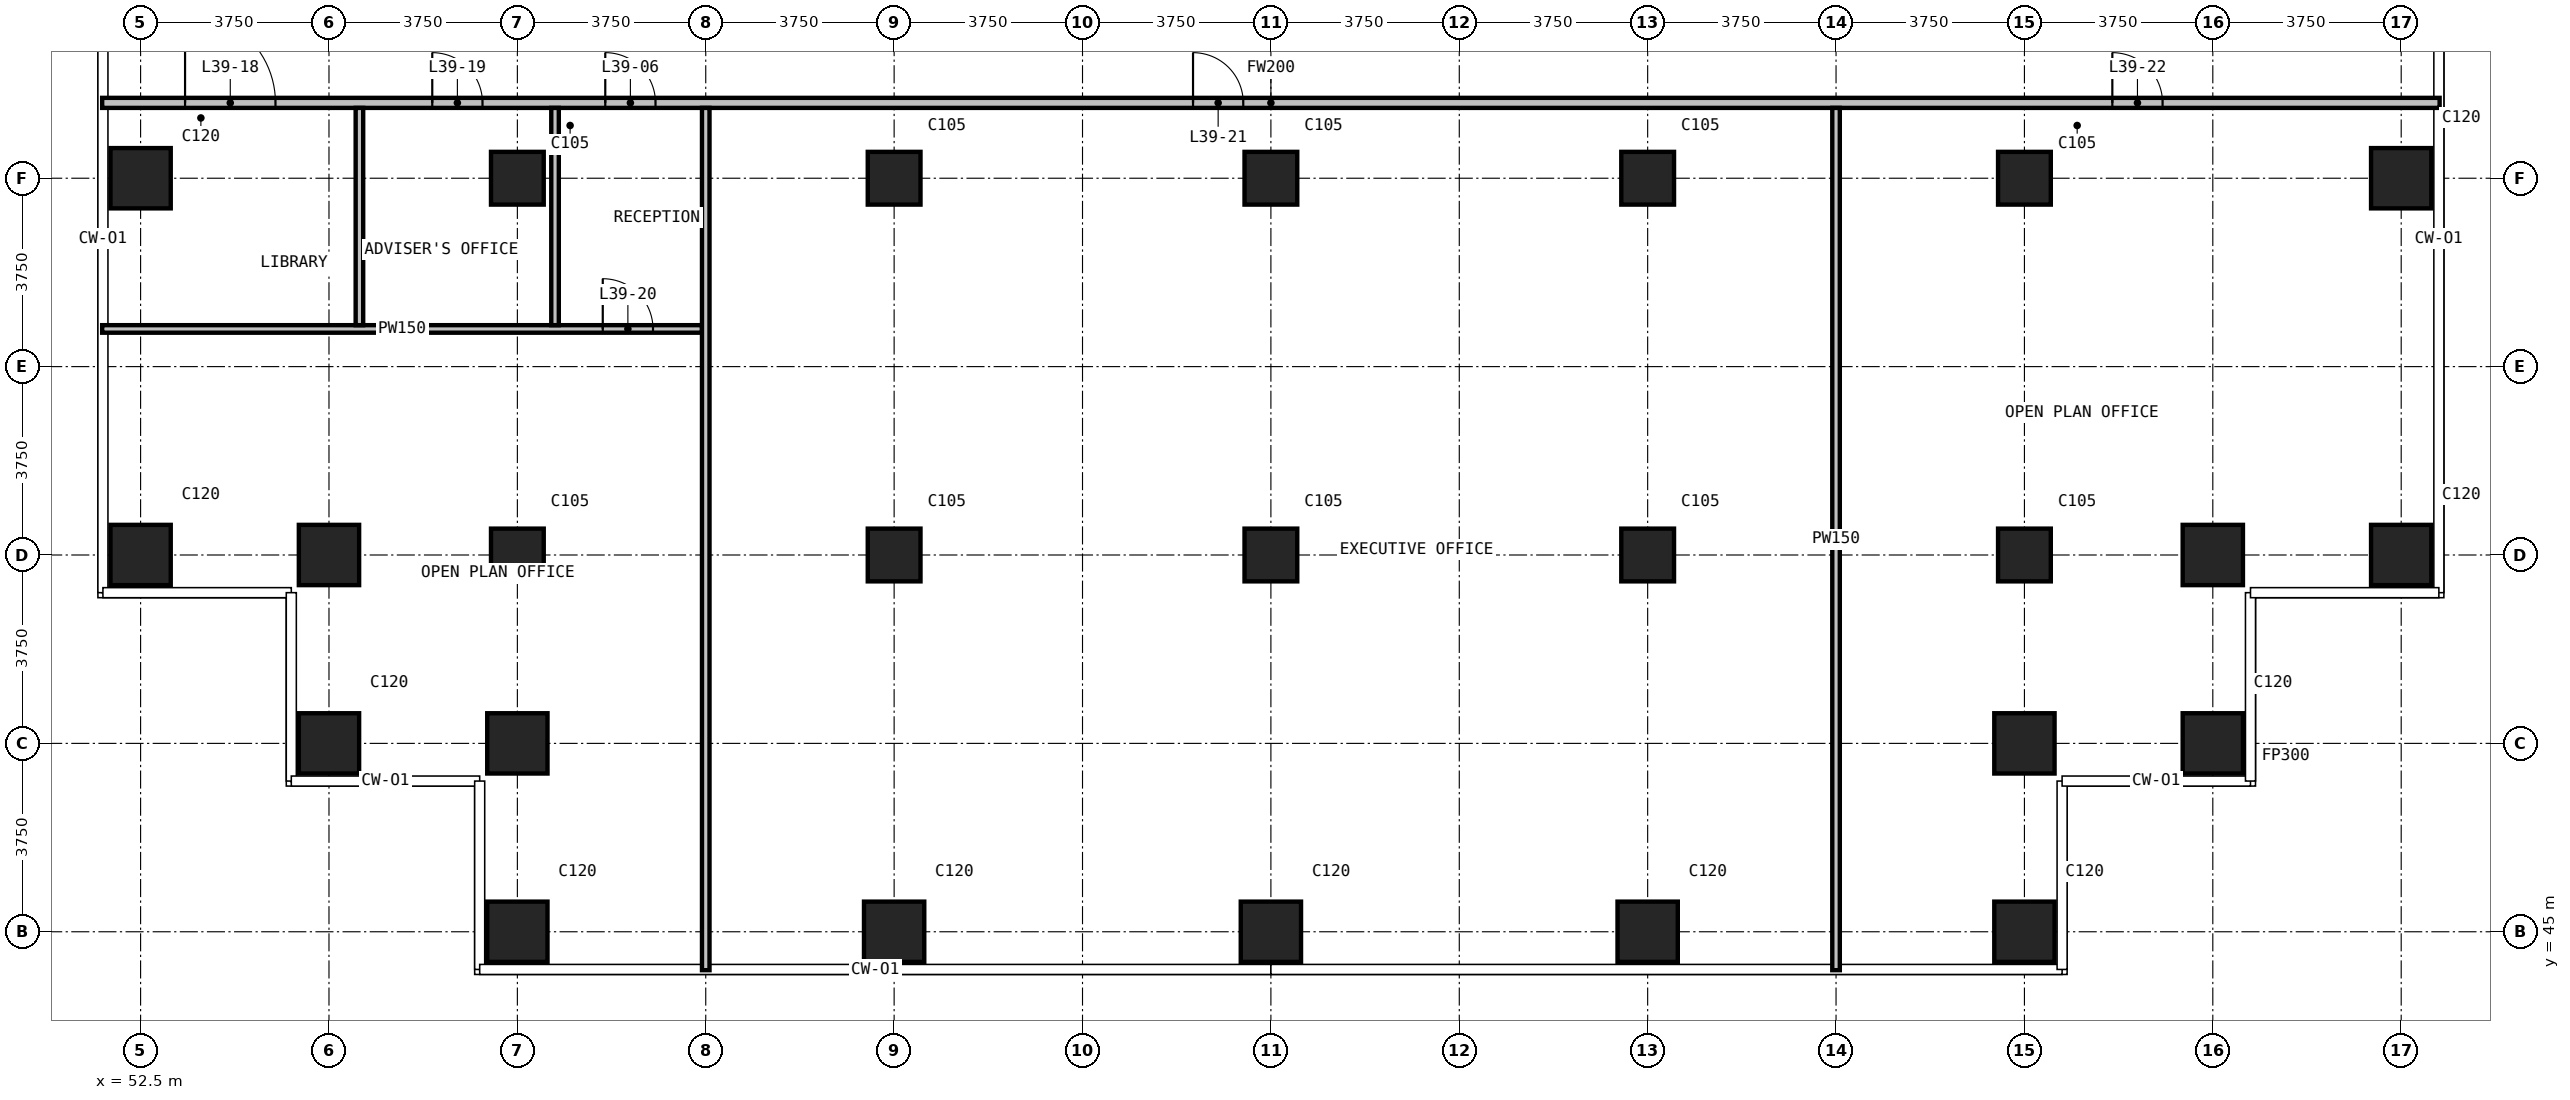
"""IFC4 building model, lengths in metres.
Left out: names, types, materials, properties, quantities, classifications, styles, units other than length and angle.
Written with IfcOpenShell. Run it as: python <this file> out.ifc"""

import sys

from ifc_helpers import new_model, si_unit, direction, frame, frame_2d, origin, origin_2d, place, context, subcontext, project, spatial, rectangle, extrude, element, fill, save


model = new_model("IFC4")
c1 = context("Model", 3, precision=1e-05, world=origin(), true_north=direction((0.0, 1.0)))
c2 = subcontext(c1, "Body", "Model", "MODEL_VIEW")
j1 = project(units=[si_unit("LENGTHUNIT", "METRE"), si_unit("PLANEANGLEUNIT", "RADIAN")], contexts=[c1])
p1 = place(None, origin())
s1 = spatial("IfcSite", under=j1, at=p1, CompositionType="ELEMENT")
p2 = place(p1, origin())
s2 = spatial("IfcBuilding", under=s1, at=p2, CompositionType="ELEMENT")
p3 = place(p2, frame((0.0, 0.0, 154.9)))
s3 = spatial("IfcBuildingStorey", under=s2, at=p3, CompositionType="ELEMENT", Elevation=154.9)
for number, where, z_axis, x_axis in (
    (1, (52.5, 52.5, 0.0), (0.0, 0.0, 1.0), (1.0, 0.0, 0.0)),
    (2, (52.5, 60.0, 0.0), (0.0, 0.0, 1.0), (1.0, 0.0, 0.0)),
    (3, (56.25, 48.75, 0.0), (0.0, 0.0, 1.0), (1.0, 0.0, 0.0)),
    (4, (56.25, 52.5, 0.0), (0.0, 0.0, 1.0), (1.0, 0.0, 0.0)),
    (5, (60.0, 45.0, 0.0), (0.0, 0.0, 1.0), (1.0, 0.0, 0.0)),
    (6, (60.0, 48.75, 0.0), (0.0, 0.0, 1.0), (1.0, 0.0, 0.0)),
):
    element("IfcColumn", number, at=place(p3, frame(where, z_axis=z_axis, x_axis=x_axis)), inside=s3, PredefinedType="COLUMN", context=c2, shape_type="SweptSolid", body=[
        extrude(rectangle(XDim=1.2, YDim=1.2, at=origin_2d()), origin(), (0.0, 0.0, 1.0), 3.6),
    ])
for number, where, z_axis, x_axis in (
    (7, (60.0, 52.5, 0.0), (0.0, 0.0, 1.0), (1.0, 0.0, 0.0)),
    (8, (60.0, 60.0, 0.0), (0.0, 0.0, 1.0), (1.0, 0.0, 0.0)),
):
    element("IfcColumn", number, at=place(p3, frame(where, z_axis=z_axis, x_axis=x_axis)), inside=s3, PredefinedType="COLUMN", context=c2, shape_type="SweptSolid", body=[
        extrude(rectangle(XDim=1.05, YDim=1.05, at=origin_2d()), origin(), (0.0, 0.0, 1.0), 3.6),
    ])
p4 = place(p3, frame((67.5, 45.0, 0.0), z_axis=(0.0, 0.0, 1.0), x_axis=(1.0, 0.0, 0.0)))
e9 = element("IfcColumn", 9, at=p4, inside=s3, PredefinedType="COLUMN", context=c2, shape_type="SweptSolid", body=[
    extrude(rectangle(XDim=1.2, YDim=1.2, at=origin_2d()), origin(), (0.0, 0.0, 1.0), 3.6),
])
for number, where, z_axis, x_axis in (
    (10, (67.5, 52.5, 0.0), (0.0, 0.0, 1.0), (1.0, 0.0, 0.0)),
    (11, (67.5, 60.0, 0.0), (0.0, 0.0, 1.0), (1.0, 0.0, 0.0)),
):
    element("IfcColumn", number, at=place(p3, frame(where, z_axis=z_axis, x_axis=x_axis)), inside=s3, PredefinedType="COLUMN", context=c2, shape_type="SweptSolid", body=[
        extrude(rectangle(XDim=1.05, YDim=1.05, at=origin_2d()), origin(), (0.0, 0.0, 1.0), 3.6),
    ])
p5 = place(p3, frame((75.0, 45.0, 0.0), z_axis=(0.0, 0.0, 1.0), x_axis=(1.0, 0.0, 0.0)))
e12 = element("IfcColumn", 12, at=p5, inside=s3, PredefinedType="COLUMN", context=c2, shape_type="SweptSolid", body=[
    extrude(rectangle(XDim=1.2, YDim=1.2, at=origin_2d()), origin(), (0.0, 0.0, 1.0), 3.6),
])
for number, where, z_axis, x_axis in (
    (13, (75.0, 52.5, 0.0), (0.0, 0.0, 1.0), (1.0, 0.0, 0.0)),
    (14, (75.0, 60.0, 0.0), (0.0, 0.0, 1.0), (1.0, 0.0, 0.0)),
):
    element("IfcColumn", number, at=place(p3, frame(where, z_axis=z_axis, x_axis=x_axis)), inside=s3, PredefinedType="COLUMN", context=c2, shape_type="SweptSolid", body=[
        extrude(rectangle(XDim=1.05, YDim=1.05, at=origin_2d()), origin(), (0.0, 0.0, 1.0), 3.6),
    ])
p6 = place(p3, frame((82.5, 45.0, 0.0), z_axis=(0.0, 0.0, 1.0), x_axis=(1.0, 0.0, 0.0)))
e15 = element("IfcColumn", 15, at=p6, inside=s3, PredefinedType="COLUMN", context=c2, shape_type="SweptSolid", body=[
    extrude(rectangle(XDim=1.2, YDim=1.2, at=origin_2d()), origin(), (0.0, 0.0, 1.0), 3.6),
])
for number, where, z_axis, x_axis in (
    (16, (82.5, 52.5, 0.0), (0.0, 0.0, 1.0), (1.0, 0.0, 0.0)),
    (17, (82.5, 60.0, 0.0), (0.0, 0.0, 1.0), (1.0, 0.0, 0.0)),
):
    element("IfcColumn", number, at=place(p3, frame(where, z_axis=z_axis, x_axis=x_axis)), inside=s3, PredefinedType="COLUMN", context=c2, shape_type="SweptSolid", body=[
        extrude(rectangle(XDim=1.05, YDim=1.05, at=origin_2d()), origin(), (0.0, 0.0, 1.0), 3.6),
    ])
for number, where, z_axis, x_axis in (
    (18, (90.0, 45.0, 0.0), (0.0, 0.0, 1.0), (1.0, 0.0, 0.0)),
    (19, (90.0, 48.75, 0.0), (0.0, 0.0, 1.0), (1.0, 0.0, 0.0)),
):
    element("IfcColumn", number, at=place(p3, frame(where, z_axis=z_axis, x_axis=x_axis)), inside=s3, PredefinedType="COLUMN", context=c2, shape_type="SweptSolid", body=[
        extrude(rectangle(XDim=1.2, YDim=1.2, at=origin_2d()), origin(), (0.0, 0.0, 1.0), 3.6),
    ])
for number, where, z_axis, x_axis in (
    (20, (90.0, 52.5, 0.0), (0.0, 0.0, 1.0), (1.0, 0.0, 0.0)),
    (21, (90.0, 60.0, 0.0), (0.0, 0.0, 1.0), (1.0, 0.0, 0.0)),
):
    element("IfcColumn", number, at=place(p3, frame(where, z_axis=z_axis, x_axis=x_axis)), inside=s3, PredefinedType="COLUMN", context=c2, shape_type="SweptSolid", body=[
        extrude(rectangle(XDim=1.05, YDim=1.05, at=origin_2d()), origin(), (0.0, 0.0, 1.0), 3.6),
    ])
for number, where, z_axis, x_axis in (
    (22, (93.75, 48.75, 0.0), (0.0, 0.0, 1.0), (1.0, 0.0, 0.0)),
    (23, (93.75, 52.5, 0.0), (0.0, 0.0, 1.0), (1.0, 0.0, 0.0)),
    (24, (97.5, 52.5, 0.0), (0.0, 0.0, 1.0), (1.0, 0.0, 0.0)),
    (25, (97.5, 60.0, 0.0), (0.0, 0.0, 1.0), (1.0, 0.0, 0.0)),
):
    element("IfcColumn", number, at=place(p3, frame(where, z_axis=z_axis, x_axis=x_axis)), inside=s3, PredefinedType="COLUMN", context=c2, shape_type="SweptSolid", body=[
        extrude(rectangle(XDim=1.2, YDim=1.2, at=origin_2d()), origin(), (0.0, 0.0, 1.0), 3.6),
    ])
p7 = place(p3, frame((51.735, 61.5, 0.0), z_axis=(0.0, 0.0, 1.0), x_axis=(1.0, 0.0, 0.0)))
e26 = element("IfcWall", 26, at=p7, inside=s3, PredefinedType="PARTITIONING", context=c2, shape_type="SweptSolid", body=[
    extrude(rectangle(XDim=46.53, YDim=0.2, at=frame_2d((23.265, 0.0))), origin(), (0.0, 0.0, 1.0), 3.3),
])
p8 = place(p7, frame((10.015, 0.0, 0.0)))
e27 = element("IfcOpeningElement", 27, at=p8, cuts=e26, PredefinedType="OPENING", context=c2, shape_type="SweptSolid", body=[
    extrude(rectangle(XDim=1.0, YDim=2.2, at=frame_2d((0.5, 1.1))), frame((0.0, 0.11, 0.0), z_axis=(0.0, -1.0, 0.0), x_axis=(1.0, 0.0, 0.0)), (0.0, 0.0, 1.0), 0.22),
])
p9 = place(p7, frame((1.65, 0.0, 0.0)))
e28 = element("IfcOpeningElement", 28, at=p9, cuts=e26, PredefinedType="OPENING", context=c2, shape_type="SweptSolid", body=[
    extrude(rectangle(XDim=1.8, YDim=2.2, at=frame_2d((0.9, 1.1))), frame((0.0, 0.11, 0.0), z_axis=(0.0, -1.0, 0.0), x_axis=(1.0, 0.0, 0.0)), (0.0, 0.0, 1.0), 0.22),
])
p10 = place(p7, frame((6.571, 0.0, 0.0)))
e29 = element("IfcOpeningElement", 29, at=p10, cuts=e26, PredefinedType="OPENING", context=c2, shape_type="SweptSolid", body=[
    extrude(rectangle(XDim=1.0, YDim=2.2, at=frame_2d((0.5, 1.1))), frame((0.0, 0.11, 0.0), z_axis=(0.0, -1.0, 0.0), x_axis=(1.0, 0.0, 0.0)), (0.0, 0.0, 1.0), 0.22),
])
p11 = place(p7, frame((21.715, 0.0, 0.0)))
e30 = element("IfcOpeningElement", 30, at=p11, cuts=e26, PredefinedType="OPENING", context=c2, shape_type="SweptSolid", body=[
    extrude(rectangle(XDim=1.0, YDim=2.2, at=frame_2d((0.5, 1.1))), frame((0.0, 0.11, 0.0), z_axis=(0.0, -1.0, 0.0), x_axis=(1.0, 0.0, 0.0)), (0.0, 0.0, 1.0), 0.22),
])
p12 = place(p7, frame((40.015, 0.0, 0.0)))
e31 = element("IfcOpeningElement", 31, at=p12, cuts=e26, PredefinedType="OPENING", context=c2, shape_type="SweptSolid", body=[
    extrude(rectangle(XDim=1.0, YDim=2.2, at=frame_2d((0.5, 1.1))), frame((0.0, 0.11, 0.0), z_axis=(0.0, -1.0, 0.0), x_axis=(1.0, 0.0, 0.0)), (0.0, 0.0, 1.0), 0.22),
])
p13 = place(p3, frame((51.735, 57.0, 0.0), z_axis=(0.0, 0.0, 1.0), x_axis=(1.0, 0.0, 0.0)))
e32 = element("IfcWall", 32, at=p13, inside=s3, PredefinedType="PARTITIONING", context=c2, shape_type="SweptSolid", body=[
    extrude(rectangle(XDim=11.94, YDim=0.15, at=frame_2d((5.97, 0.0))), origin(), (0.0, 0.0, 1.0), 3.3),
])
p14 = place(p13, frame((9.965, 0.0, 0.0)))
e33 = element("IfcOpeningElement", 33, at=p14, cuts=e32, PredefinedType="OPENING", context=c2, shape_type="SweptSolid", body=[
    extrude(rectangle(XDim=1.0, YDim=2.2, at=frame_2d((0.5, 1.1))), frame((0.0, 0.085, 0.0), z_axis=(0.0, -1.0, 0.0), x_axis=(1.0, 0.0, 0.0)), (0.0, 0.0, 1.0), 0.17),
])
for number, where, z_axis, x_axis in (
    (34, (56.856, 57.075, 0.0), (0.0, 0.0, 1.0), (0.0, 1.0, 0.0)),
    (35, (60.75, 57.075, 0.0), (0.0, 0.0, 1.0), (0.0, 1.0, 0.0)),
):
    element("IfcWall", number, at=place(p3, frame(where, z_axis=z_axis, x_axis=x_axis)), inside=s3, PredefinedType="PARTITIONING", context=c2, shape_type="SweptSolid", body=[
        extrude(rectangle(XDim=4.325, YDim=0.15, at=frame_2d((2.163, 0.0))), origin(), (0.0, 0.0, 1.0), 3.3),
    ])
for number, where, z_axis, x_axis in (
    (36, (63.75, 44.235, 0.0), (0.0, 0.0, 1.0), (0.0, 1.0, 0.0)),
    (37, (86.25, 44.235, 0.0), (0.0, 0.0, 1.0), (0.0, 1.0, 0.0)),
):
    element("IfcWall", number, at=place(p3, frame(where, z_axis=z_axis, x_axis=x_axis)), inside=s3, PredefinedType="PARTITIONING", context=c2, shape_type="SweptSolid", body=[
        extrude(rectangle(XDim=17.165, YDim=0.15, at=frame_2d((8.583, 0.0))), origin(), (0.0, 0.0, 1.0), 3.3),
    ])
p15 = place(p8, origin())
e38 = element("IfcDoor", 38, at=p15, inside=s3, OperationType="SINGLE_SWING_RIGHT", PredefinedType="DOOR", context=c2, shape_type="SweptSolid", body=[
    extrude(rectangle(XDim=1.0, YDim=2.2, at=frame_2d((0.5, 1.1))), frame((0.0, 0.025, 0.0), z_axis=(0.0, -1.0, 0.0), x_axis=(1.0, 0.0, 0.0)), (0.0, 0.0, 1.0), 0.05),
])
fill(e27, e38)
p16 = place(p9, origin())
e39 = element("IfcDoor", 39, at=p16, inside=s3, OperationType="DOUBLE_DOOR_SINGLE_SWING", PredefinedType="DOOR", context=c2, shape_type="SweptSolid", body=[
    extrude(rectangle(XDim=1.8, YDim=2.2, at=frame_2d((0.9, 1.1))), frame((0.0, 0.025, 0.0), z_axis=(0.0, -1.0, 0.0), x_axis=(1.0, 0.0, 0.0)), (0.0, 0.0, 1.0), 0.05),
])
fill(e28, e39)
p17 = place(p10, origin())
e40 = element("IfcDoor", 40, at=p17, inside=s3, OperationType="SINGLE_SWING_LEFT", PredefinedType="DOOR", context=c2, shape_type="SweptSolid", body=[
    extrude(rectangle(XDim=1.0, YDim=2.2, at=frame_2d((0.5, 1.1))), frame((0.0, 0.025, 0.0), z_axis=(0.0, -1.0, 0.0), x_axis=(1.0, 0.0, 0.0)), (0.0, 0.0, 1.0), 0.05),
])
fill(e29, e40)
p18 = place(p14, origin())
e41 = element("IfcDoor", 41, at=p18, inside=s3, OperationType="SINGLE_SWING_LEFT", PredefinedType="DOOR", context=c2, shape_type="SweptSolid", body=[
    extrude(rectangle(XDim=1.0, YDim=2.2, at=frame_2d((0.5, 1.1))), frame((0.0, 0.025, 0.0), z_axis=(0.0, -1.0, 0.0), x_axis=(1.0, 0.0, 0.0)), (0.0, 0.0, 1.0), 0.05),
])
fill(e33, e41)
p19 = place(p11, origin())
e42 = element("IfcDoor", 42, at=p19, inside=s3, OperationType="SINGLE_SWING_LEFT", PredefinedType="DOOR", context=c2, shape_type="SweptSolid", body=[
    extrude(rectangle(XDim=1.0, YDim=2.2, at=frame_2d((0.5, 1.1))), frame((0.0, 0.025, 0.0), z_axis=(0.0, -1.0, 0.0), x_axis=(1.0, 0.0, 0.0)), (0.0, 0.0, 1.0), 0.05),
])
fill(e30, e42)
p20 = place(p12, origin())
e43 = element("IfcDoor", 43, at=p20, inside=s3, OperationType="SINGLE_SWING_LEFT", PredefinedType="DOOR", context=c2, shape_type="SweptSolid", body=[
    extrude(rectangle(XDim=1.0, YDim=2.2, at=frame_2d((0.5, 1.1))), frame((0.0, 0.025, 0.0), z_axis=(0.0, -1.0, 0.0), x_axis=(1.0, 0.0, 0.0)), (0.0, 0.0, 1.0), 0.05),
])
fill(e31, e43)
save(model, sys.argv[1])
